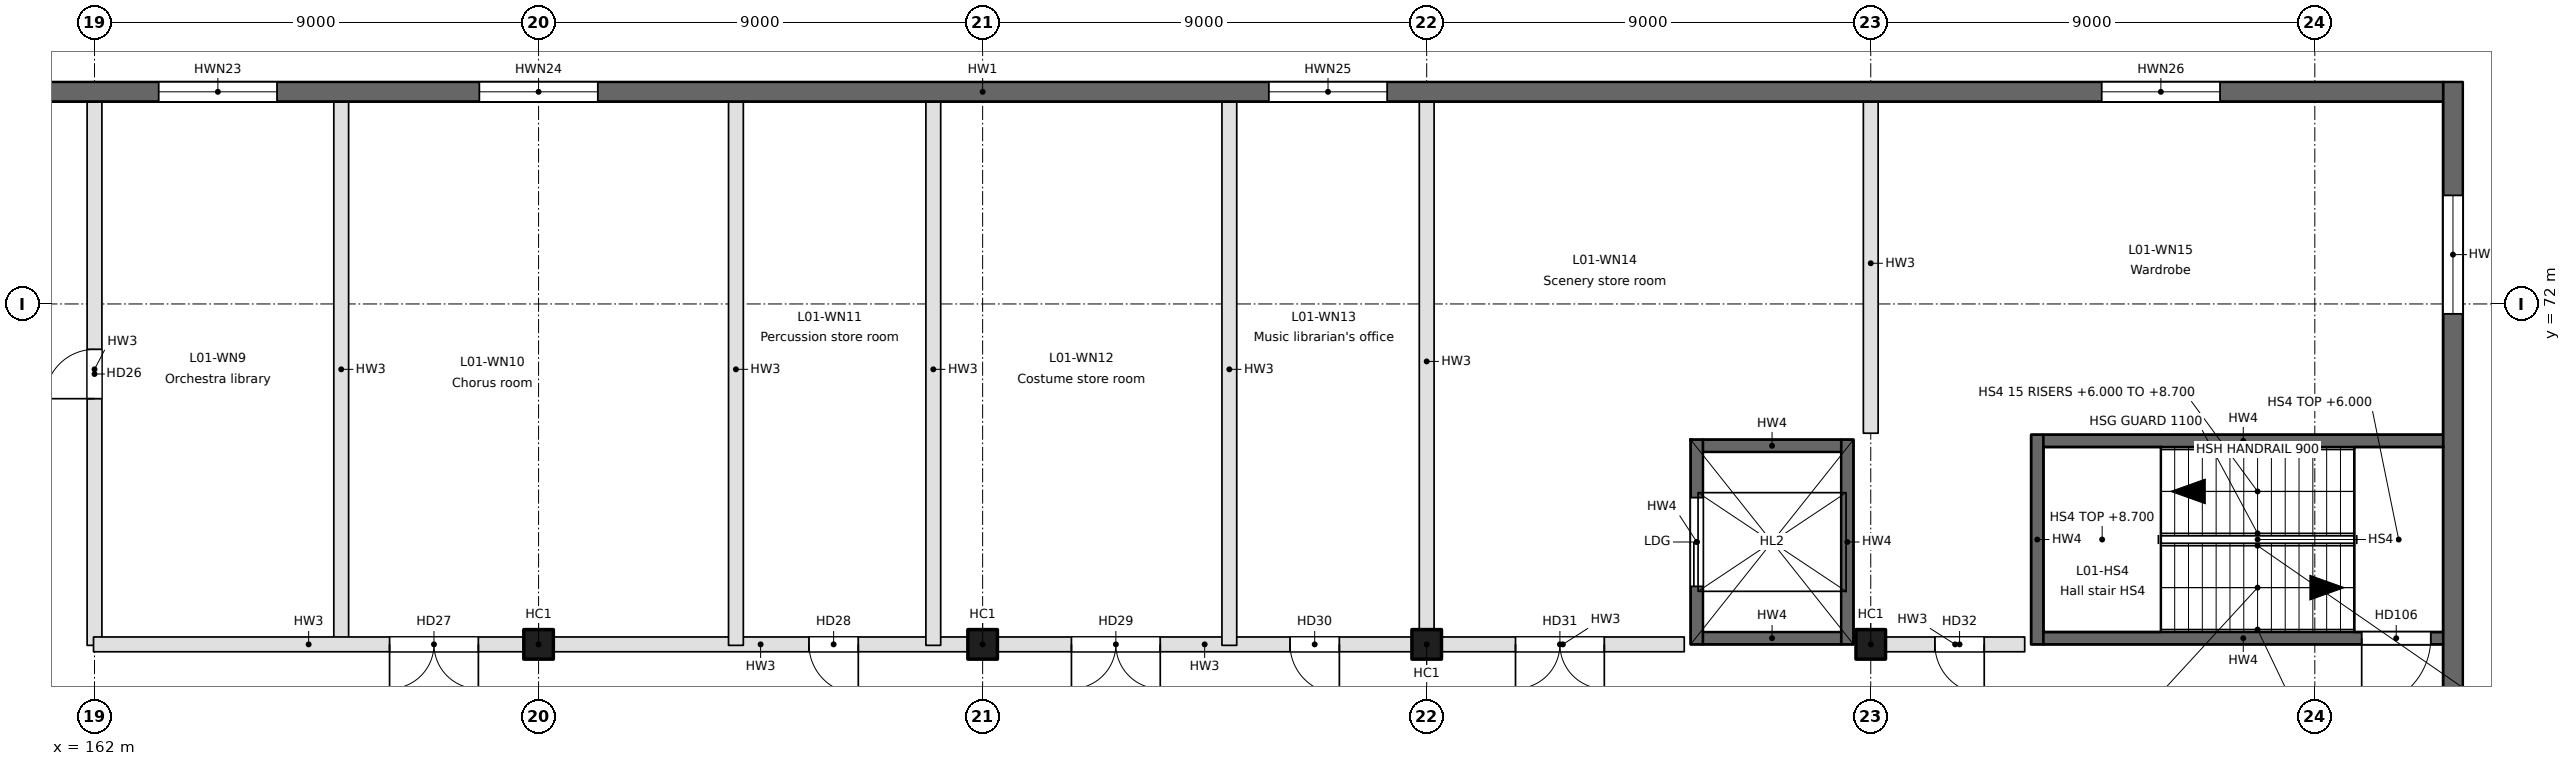
"""IFC4 building model, lengths in metres.
Left out: names, types, materials, properties, quantities, classifications, styles, units other than length and angle.
Written with IfcOpenShell. Run it as: python <this file> out.ifc"""

import sys

from ifc_helpers import new_model, si_unit, direction, frame, frame_2d, origin, origin_2d, place, context, subcontext, project, spatial, rectangle, extrude, element, fill, save


model = new_model("IFC4")
c1 = context("Model", 3, precision=1e-05, world=origin(), true_north=direction((0.0, 1.0)))
c2 = subcontext(c1, "Body", "Model", "MODEL_VIEW")
j1 = project(units=[si_unit("LENGTHUNIT", "METRE"), si_unit("PLANEANGLEUNIT", "RADIAN")], contexts=[c1])
p1 = place(None, origin())
s1 = spatial("IfcSite", under=j1, at=p1, CompositionType="ELEMENT")
p2 = place(p1, origin())
s2 = spatial("IfcBuilding", under=s1, at=p2, CompositionType="ELEMENT")
p3 = place(p2, frame((0.0, 0.0, 6.0)))
s3 = spatial("IfcBuildingStorey", under=s2, at=p3, CompositionType="ELEMENT", Elevation=6.0)
for number, where, z_axis, x_axis in (
    (1, (171.0, 65.1, 0.0), (0.0, 0.0, 1.0), (1.0, 0.0, 0.0)),
    (2, (180.0, 65.1, 0.0), (0.0, 0.0, 1.0), (1.0, 0.0, 0.0)),
    (3, (189.0, 65.1, 0.0), (0.0, 0.0, 1.0), (1.0, 0.0, 0.0)),
    (4, (198.0, 65.1, 0.0), (0.0, 0.0, 1.0), (1.0, 0.0, 0.0)),
):
    element("IfcColumn", number, at=place(p3, frame(where, z_axis=z_axis, x_axis=x_axis)), inside=s3, PredefinedType="COLUMN", context=c2, shape_type="SweptSolid", body=[
        extrude(rectangle(XDim=0.6, YDim=0.6, at=origin_2d()), origin(), (0.0, 0.0, 1.0), 5.4),
    ])
p4 = place(p3, frame((209.8, 76.5, -0.35), z_axis=(0.0, 0.0, 1.0), x_axis=(0.0, -1.0, 0.0)))
e5 = element("IfcWall", 5, at=p4, inside=s3, PredefinedType="SOLIDWALL", context=c2, shape_type="SweptSolid", body=[
    extrude(rectangle(XDim=54.0, YDim=0.4, at=frame_2d((27.0, 0.0))), origin(), (0.0, 0.0, 1.0), 5.4),
])
p5 = place(p4, frame((49.3, 0.0, 1.25)))
e6 = element("IfcOpeningElement", 6, at=p5, cuts=e5, PredefinedType="OPENING", context=c2, shape_type="SweptSolid", body=[
    extrude(rectangle(XDim=2.4, YDim=1.8, at=frame_2d((1.2, 0.9))), frame((0.0, 0.2, 0.0), z_axis=(0.0, -1.0, 0.0), x_axis=(1.0, 0.0, 0.0)), (0.0, 0.0, 1.0), 0.4),
])
p6 = place(p4, frame((2.3, 0.0, 1.25)))
e7 = element("IfcOpeningElement", 7, at=p6, cuts=e5, PredefinedType="OPENING", context=c2, shape_type="SweptSolid", body=[
    extrude(rectangle(XDim=2.4, YDim=1.8, at=frame_2d((1.2, 0.9))), frame((0.0, 0.2, 0.0), z_axis=(0.0, -1.0, 0.0), x_axis=(1.0, 0.0, 0.0)), (0.0, 0.0, 1.0), 0.4),
])
p7 = place(p3, frame((150.4, 76.3, -0.35), z_axis=(0.0, 0.0, 1.0), x_axis=(1.0, 0.0, 0.0)))
e8 = element("IfcWall", 8, at=p7, inside=s3, PredefinedType="SOLIDWALL", context=c2, shape_type="SweptSolid", body=[
    extrude(rectangle(XDim=59.2, YDim=0.4, at=frame_2d((29.6, 0.0))), origin(), (0.0, 0.0, 1.0), 5.4),
])
p8 = place(p7, frame((7.6, 0.0, 1.25)))
e9 = element("IfcOpeningElement", 9, at=p8, cuts=e8, PredefinedType="OPENING", context=c2, shape_type="SweptSolid", body=[
    extrude(rectangle(XDim=2.4, YDim=1.8, at=frame_2d((1.2, 0.9))), frame((0.0, 0.2, 0.0), z_axis=(0.0, -1.0, 0.0), x_axis=(1.0, 0.0, 0.0)), (0.0, 0.0, 1.0), 0.4),
])
p9 = place(p7, frame((12.9, 0.0, 1.25)))
e10 = element("IfcOpeningElement", 10, at=p9, cuts=e8, PredefinedType="OPENING", context=c2, shape_type="SweptSolid", body=[
    extrude(rectangle(XDim=2.4, YDim=1.8, at=frame_2d((1.2, 0.9))), frame((0.0, 0.2, 0.0), z_axis=(0.0, -1.0, 0.0), x_axis=(1.0, 0.0, 0.0)), (0.0, 0.0, 1.0), 0.4),
])
p10 = place(p7, frame((19.4, 0.0, 1.25)))
e11 = element("IfcOpeningElement", 11, at=p10, cuts=e8, PredefinedType="OPENING", context=c2, shape_type="SweptSolid", body=[
    extrude(rectangle(XDim=2.4, YDim=1.8, at=frame_2d((1.2, 0.9))), frame((0.0, 0.2, 0.0), z_axis=(0.0, -1.0, 0.0), x_axis=(1.0, 0.0, 0.0)), (0.0, 0.0, 1.0), 0.4),
])
p11 = place(p7, frame((35.4, 0.0, 1.25)))
e12 = element("IfcOpeningElement", 12, at=p11, cuts=e8, PredefinedType="OPENING", context=c2, shape_type="SweptSolid", body=[
    extrude(rectangle(XDim=2.4, YDim=1.8, at=frame_2d((1.2, 0.9))), frame((0.0, 0.2, 0.0), z_axis=(0.0, -1.0, 0.0), x_axis=(1.0, 0.0, 0.0)), (0.0, 0.0, 1.0), 0.4),
])
p12 = place(p7, frame((52.28, 0.0, 1.25)))
e13 = element("IfcOpeningElement", 13, at=p12, cuts=e8, PredefinedType="OPENING", context=c2, shape_type="SweptSolid", body=[
    extrude(rectangle(XDim=2.4, YDim=1.8, at=frame_2d((1.2, 0.9))), frame((0.0, 0.2, 0.0), z_axis=(0.0, -1.0, 0.0), x_axis=(1.0, 0.0, 0.0)), (0.0, 0.0, 1.0), 0.4),
])
p13 = place(p3, frame((162.0, 65.08, 0.0), z_axis=(0.0, 0.0, 1.0), x_axis=(0.0, 1.0, 0.0)))
e14 = element("IfcWall", 14, at=p13, inside=s3, PredefinedType="PARTITIONING", context=c2, shape_type="SweptSolid", body=[
    extrude(rectangle(XDim=11.19, YDim=0.3, at=frame_2d((5.595, 0.0))), origin(), (0.0, 0.0, 1.0), 5.05),
])
p14 = place(p13, frame((5.0, 0.0, 0.0)))
e15 = element("IfcOpeningElement", 15, at=p14, cuts=e14, PredefinedType="OPENING", context=c2, shape_type="SweptSolid", body=[
    extrude(rectangle(XDim=1.0, YDim=2.1, at=frame_2d((0.5, 1.05))), frame((0.0, 0.15, 0.0), z_axis=(0.0, -1.0, 0.0), x_axis=(1.0, 0.0, 0.0)), (0.0, 0.0, 1.0), 0.3),
])
p15 = place(p3, frame((198.0, 69.38, 0.0), z_axis=(0.0, 0.0, 1.0), x_axis=(0.0, 1.0, 0.0)))
e16 = element("IfcWall", 16, at=p15, inside=s3, PredefinedType="PARTITIONING", context=c2, shape_type="SweptSolid", body=[
    extrude(rectangle(XDim=6.89, YDim=0.3, at=frame_2d((3.445, 0.0))), origin(), (0.0, 0.0, 1.0), 5.05),
])
p16 = place(p3, frame((167.0, 65.08, 0.0), z_axis=(0.0, 0.0, 1.0), x_axis=(0.0, 1.0, 0.0)))
e17 = element("IfcWall", 17, at=p16, inside=s3, PredefinedType="PARTITIONING", context=c2, shape_type="SweptSolid", body=[
    extrude(rectangle(XDim=11.19, YDim=0.3, at=frame_2d((5.595, 0.0))), origin(), (0.0, 0.0, 1.0), 5.05),
])
p17 = place(p3, frame((170.7, 65.1, 0.0), z_axis=(0.0, 0.0, 1.0), x_axis=(-1.0, 0.0, 0.0)))
e18 = element("IfcWall", 18, at=p17, inside=s3, PredefinedType="PARTITIONING", context=c2, shape_type="SweptSolid", body=[
    extrude(rectangle(XDim=8.72, YDim=0.3, at=frame_2d((4.36, 0.0))), origin(), (0.0, 0.0, 1.0), 5.05),
])
p18 = place(p17, frame((0.92, 0.0, 0.0)))
e19 = element("IfcOpeningElement", 19, at=p18, cuts=e18, PredefinedType="OPENING", context=c2, shape_type="SweptSolid", body=[
    extrude(rectangle(XDim=1.8, YDim=2.1, at=frame_2d((0.9, 1.05))), frame((0.0, 0.15, 0.0), z_axis=(0.0, -1.0, 0.0), x_axis=(1.0, 0.0, 0.0)), (0.0, 0.0, 1.0), 0.3),
])
p19 = place(p3, frame((179.7, 65.1, 0.0), z_axis=(0.0, 0.0, 1.0), x_axis=(-1.0, 0.0, 0.0)))
e20 = element("IfcWall", 20, at=p19, inside=s3, PredefinedType="PARTITIONING", context=c2, shape_type="SweptSolid", body=[
    extrude(rectangle(XDim=8.4, YDim=0.3, at=frame_2d((4.2, 0.0))), origin(), (0.0, 0.0, 1.0), 5.05),
])
p20 = place(p19, frame((2.22, 0.0, 0.0)))
e21 = element("IfcOpeningElement", 21, at=p20, cuts=e20, PredefinedType="OPENING", context=c2, shape_type="SweptSolid", body=[
    extrude(rectangle(XDim=1.0, YDim=2.1, at=frame_2d((0.5, 1.05))), frame((0.0, 0.15, 0.0), z_axis=(0.0, -1.0, 0.0), x_axis=(1.0, 0.0, 0.0)), (0.0, 0.0, 1.0), 0.3),
])
p21 = place(p3, frame((188.7, 65.1, 0.0), z_axis=(0.0, 0.0, 1.0), x_axis=(-1.0, 0.0, 0.0)))
e22 = element("IfcWall", 22, at=p21, inside=s3, PredefinedType="PARTITIONING", context=c2, shape_type="SweptSolid", body=[
    extrude(rectangle(XDim=8.4, YDim=0.3, at=frame_2d((4.2, 0.0))), origin(), (0.0, 0.0, 1.0), 5.05),
])
p22 = place(p21, frame((5.1, 0.0, 0.0)))
e23 = element("IfcOpeningElement", 23, at=p22, cuts=e22, PredefinedType="OPENING", context=c2, shape_type="SweptSolid", body=[
    extrude(rectangle(XDim=1.8, YDim=2.1, at=frame_2d((0.9, 1.05))), frame((0.0, 0.15, 0.0), z_axis=(0.0, -1.0, 0.0), x_axis=(1.0, 0.0, 0.0)), (0.0, 0.0, 1.0), 0.3),
])
p23 = place(p21, frame((1.47, 0.0, 0.0)))
e24 = element("IfcOpeningElement", 24, at=p23, cuts=e22, PredefinedType="OPENING", context=c2, shape_type="SweptSolid", body=[
    extrude(rectangle(XDim=1.0, YDim=2.1, at=frame_2d((0.5, 1.05))), frame((0.0, 0.15, 0.0), z_axis=(0.0, -1.0, 0.0), x_axis=(1.0, 0.0, 0.0)), (0.0, 0.0, 1.0), 0.3),
])
p24 = place(p3, frame((194.22, 65.1, 0.0), z_axis=(0.0, 0.0, 1.0), x_axis=(-1.0, 0.0, 0.0)))
e25 = element("IfcWall", 25, at=p24, inside=s3, PredefinedType="PARTITIONING", context=c2, shape_type="SweptSolid", body=[
    extrude(rectangle(XDim=4.92, YDim=0.3, at=frame_2d((2.46, 0.0))), origin(), (0.0, 0.0, 1.0), 5.05),
])
p25 = place(p24, frame((1.62, 0.0, 0.0)))
e26 = element("IfcOpeningElement", 26, at=p25, cuts=e25, PredefinedType="OPENING", context=c2, shape_type="SweptSolid", body=[
    extrude(rectangle(XDim=1.8, YDim=2.1, at=frame_2d((0.9, 1.05))), frame((0.0, 0.15, 0.0), z_axis=(0.0, -1.0, 0.0), x_axis=(1.0, 0.0, 0.0)), (0.0, 0.0, 1.0), 0.3),
])
p26 = place(p3, frame((201.12, 65.1, 0.0), z_axis=(0.0, 0.0, 1.0), x_axis=(-1.0, 0.0, 0.0)))
e27 = element("IfcWall", 27, at=p26, inside=s3, PredefinedType="PARTITIONING", context=c2, shape_type="SweptSolid", body=[
    extrude(rectangle(XDim=2.82, YDim=0.3, at=frame_2d((1.41, 0.0))), origin(), (0.0, 0.0, 1.0), 5.05),
])
p27 = place(p26, frame((0.82, 0.0, 0.0)))
e28 = element("IfcOpeningElement", 28, at=p27, cuts=e27, PredefinedType="OPENING", context=c2, shape_type="SweptSolid", body=[
    extrude(rectangle(XDim=1.0, YDim=2.1, at=frame_2d((0.5, 1.05))), frame((0.0, 0.15, 0.0), z_axis=(0.0, -1.0, 0.0), x_axis=(1.0, 0.0, 0.0)), (0.0, 0.0, 1.0), 0.3),
])
for number, where, z_axis, x_axis in (
    (29, (175.0, 65.08, 0.0), (0.0, 0.0, 1.0), (0.0, 1.0, 0.0)),
    (30, (179.0, 65.08, 0.0), (0.0, 0.0, 1.0), (0.0, 1.0, 0.0)),
    (31, (185.0, 65.08, 0.0), (0.0, 0.0, 1.0), (0.0, 1.0, 0.0)),
):
    element("IfcWall", number, at=place(p3, frame(where, z_axis=z_axis, x_axis=x_axis)), inside=s3, PredefinedType="PARTITIONING", context=c2, shape_type="SweptSolid", body=[
        extrude(rectangle(XDim=11.19, YDim=0.3, at=frame_2d((5.595, 0.0))), origin(), (0.0, 0.0, 1.0), 5.05),
    ])
p28 = place(p3, frame((189.0, 65.4, 0.0), z_axis=(0.0, 0.0, 1.0), x_axis=(0.0, 1.0, 0.0)))
e32 = element("IfcWall", 32, at=p28, inside=s3, PredefinedType="PARTITIONING", context=c2, shape_type="SweptSolid", body=[
    extrude(rectangle(XDim=10.87, YDim=0.3, at=frame_2d((5.435, 0.0))), origin(), (0.0, 0.0, 1.0), 5.05),
])
p29 = place(p3, frame((201.375, 65.1, -0.35), z_axis=(0.0, 0.0, 1.0), x_axis=(0.0, 1.0, 0.0)))
e33 = element("IfcWall", 33, at=p29, inside=s3, PredefinedType="SOLIDWALL", context=c2, shape_type="SweptSolid", body=[
    extrude(rectangle(XDim=4.25, YDim=0.25, at=frame_2d((2.125, 0.0))), origin(), (0.0, 0.0, 1.0), 5.4),
])
p30 = place(p3, frame((209.6, 65.225, -0.35), z_axis=(0.0, 0.0, 1.0), x_axis=(-1.0, 0.0, 0.0)))
e34 = element("IfcWall", 34, at=p30, inside=s3, PredefinedType="SOLIDWALL", context=c2, shape_type="SweptSolid", body=[
    extrude(rectangle(XDim=8.1, YDim=0.25, at=frame_2d((4.05, 0.0))), origin(), (0.0, 0.0, 1.0), 5.4),
])
p31 = place(p30, frame((0.25, 0.0, 0.35)))
e35 = element("IfcOpeningElement", 35, at=p31, cuts=e34, PredefinedType="OPENING", context=c2, shape_type="SweptSolid", body=[
    extrude(rectangle(XDim=1.4, YDim=2.1, at=frame_2d((0.7, 1.05))), frame((0.0, 0.125, 0.0), z_axis=(0.0, -1.0, 0.0), x_axis=(1.0, 0.0, 0.0)), (0.0, 0.0, 1.0), 0.25),
])
p32 = place(p3, frame((201.5, 69.225, -0.35), z_axis=(0.0, 0.0, 1.0), x_axis=(1.0, 0.0, 0.0)))
e36 = element("IfcWall", 36, at=p32, inside=s3, PredefinedType="SOLIDWALL", context=c2, shape_type="SweptSolid", body=[
    extrude(rectangle(XDim=8.1, YDim=0.25, at=frame_2d((4.05, 0.0))), origin(), (0.0, 0.0, 1.0), 5.4),
])
p33 = place(p3, frame((194.475, 65.1, -0.35), z_axis=(0.0, 0.0, 1.0), x_axis=(0.0, 1.0, 0.0)))
e37 = element("IfcWall", 37, at=p33, inside=s3, PredefinedType="SOLIDWALL", context=c2, shape_type="SweptSolid", body=[
    extrude(rectangle(XDim=4.15, YDim=0.25, at=frame_2d((2.075, 0.0))), origin(), (0.0, 0.0, 1.0), 5.4),
])
p34 = place(p33, frame((1.175, 0.0, 0.35)))
e38 = element("IfcOpeningElement", 38, at=p34, cuts=e37, PredefinedType="OPENING", context=c2, shape_type="SweptSolid", body=[
    extrude(rectangle(XDim=1.8, YDim=2.4, at=frame_2d((0.9, 1.2))), frame((0.0, 0.125, 0.0), z_axis=(0.0, -1.0, 0.0), x_axis=(1.0, 0.0, 0.0)), (0.0, 0.0, 1.0), 0.25),
])
p35 = place(p3, frame((197.525, 69.25, -0.35), z_axis=(0.0, 0.0, 1.0), x_axis=(0.0, -1.0, 0.0)))
e39 = element("IfcWall", 39, at=p35, inside=s3, PredefinedType="SOLIDWALL", context=c2, shape_type="SweptSolid", body=[
    extrude(rectangle(XDim=4.15, YDim=0.25, at=frame_2d((2.075, 0.0))), origin(), (0.0, 0.0, 1.0), 5.4),
])
for number, where, z_axis, x_axis in (
    (40, (197.4, 65.225, -0.35), (0.0, 0.0, 1.0), (-1.0, 0.0, 0.0)),
    (41, (194.6, 69.125, -0.35), (0.0, 0.0, 1.0), (1.0, 0.0, 0.0)),
):
    element("IfcWall", number, at=place(p3, frame(where, z_axis=z_axis, x_axis=x_axis)), inside=s3, PredefinedType="SOLIDWALL", context=c2, shape_type="SweptSolid", body=[
        extrude(rectangle(XDim=2.8, YDim=0.25, at=frame_2d((1.4, 0.0))), origin(), (0.0, 0.0, 1.0), 5.4),
    ])
p36 = place(p14, origin())
e42 = element("IfcDoor", 42, at=p36, inside=s3, OperationType="SINGLE_SWING_LEFT", PredefinedType="DOOR", context=c2, shape_type="SweptSolid", body=[
    extrude(rectangle(XDim=1.0, YDim=2.1, at=frame_2d((0.5, 1.05))), frame((0.0, 0.025, 0.0), z_axis=(0.0, -1.0, 0.0), x_axis=(1.0, 0.0, 0.0)), (0.0, 0.0, 1.0), 0.05),
])
fill(e15, e42)
p37 = place(p18, origin())
e43 = element("IfcDoor", 43, at=p37, inside=s3, OperationType="DOUBLE_DOOR_SINGLE_SWING", PredefinedType="DOOR", context=c2, shape_type="SweptSolid", body=[
    extrude(rectangle(XDim=1.8, YDim=2.1, at=frame_2d((0.9, 1.05))), frame((0.0, 0.025, 0.0), z_axis=(0.0, -1.0, 0.0), x_axis=(1.0, 0.0, 0.0)), (0.0, 0.0, 1.0), 0.05),
])
fill(e19, e43)
p38 = place(p20, origin())
e44 = element("IfcDoor", 44, at=p38, inside=s3, OperationType="SINGLE_SWING_LEFT", PredefinedType="DOOR", context=c2, shape_type="SweptSolid", body=[
    extrude(rectangle(XDim=1.0, YDim=2.1, at=frame_2d((0.5, 1.05))), frame((0.0, 0.025, 0.0), z_axis=(0.0, -1.0, 0.0), x_axis=(1.0, 0.0, 0.0)), (0.0, 0.0, 1.0), 0.05),
])
fill(e21, e44)
p39 = place(p22, origin())
e45 = element("IfcDoor", 45, at=p39, inside=s3, OperationType="DOUBLE_DOOR_SINGLE_SWING", PredefinedType="DOOR", context=c2, shape_type="SweptSolid", body=[
    extrude(rectangle(XDim=1.8, YDim=2.1, at=frame_2d((0.9, 1.05))), frame((0.0, 0.025, 0.0), z_axis=(0.0, -1.0, 0.0), x_axis=(1.0, 0.0, 0.0)), (0.0, 0.0, 1.0), 0.05),
])
fill(e23, e45)
p40 = place(p23, origin())
e46 = element("IfcDoor", 46, at=p40, inside=s3, OperationType="SINGLE_SWING_LEFT", PredefinedType="DOOR", context=c2, shape_type="SweptSolid", body=[
    extrude(rectangle(XDim=1.0, YDim=2.1, at=frame_2d((0.5, 1.05))), frame((0.0, 0.025, 0.0), z_axis=(0.0, -1.0, 0.0), x_axis=(1.0, 0.0, 0.0)), (0.0, 0.0, 1.0), 0.05),
])
fill(e24, e46)
p41 = place(p25, origin())
e47 = element("IfcDoor", 47, at=p41, inside=s3, OperationType="DOUBLE_DOOR_SINGLE_SWING", PredefinedType="DOOR", context=c2, shape_type="SweptSolid", body=[
    extrude(rectangle(XDim=1.8, YDim=2.1, at=frame_2d((0.9, 1.05))), frame((0.0, 0.025, 0.0), z_axis=(0.0, -1.0, 0.0), x_axis=(1.0, 0.0, 0.0)), (0.0, 0.0, 1.0), 0.05),
])
fill(e26, e47)
p42 = place(p27, origin())
e48 = element("IfcDoor", 48, at=p42, inside=s3, OperationType="SINGLE_SWING_LEFT", PredefinedType="DOOR", context=c2, shape_type="SweptSolid", body=[
    extrude(rectangle(XDim=1.0, YDim=2.1, at=frame_2d((0.5, 1.05))), frame((0.0, 0.025, 0.0), z_axis=(0.0, -1.0, 0.0), x_axis=(1.0, 0.0, 0.0)), (0.0, 0.0, 1.0), 0.05),
])
fill(e28, e48)
p43 = place(p6, origin())
e49 = element("IfcWindow", 49, at=p43, inside=s3, PartitioningType="SINGLE_PANEL", PredefinedType="WINDOW", context=c2, shape_type="SweptSolid", body=[
    extrude(rectangle(XDim=2.4, YDim=1.8, at=frame_2d((1.2, 0.9))), frame((0.0, 0.03, 0.0), z_axis=(0.0, -1.0, 0.0), x_axis=(1.0, 0.0, 0.0)), (0.0, 0.0, 1.0), 0.06),
])
fill(e7, e49)
p44 = place(p9, origin())
e50 = element("IfcWindow", 50, at=p44, inside=s3, PartitioningType="SINGLE_PANEL", PredefinedType="WINDOW", context=c2, shape_type="SweptSolid", body=[
    extrude(rectangle(XDim=2.4, YDim=1.8, at=frame_2d((1.2, 0.9))), frame((0.0, 0.03, 0.0), z_axis=(0.0, -1.0, 0.0), x_axis=(1.0, 0.0, 0.0)), (0.0, 0.0, 1.0), 0.06),
])
fill(e10, e50)
p45 = place(p10, origin())
e51 = element("IfcWindow", 51, at=p45, inside=s3, PartitioningType="SINGLE_PANEL", PredefinedType="WINDOW", context=c2, shape_type="SweptSolid", body=[
    extrude(rectangle(XDim=2.4, YDim=1.8, at=frame_2d((1.2, 0.9))), frame((0.0, 0.03, 0.0), z_axis=(0.0, -1.0, 0.0), x_axis=(1.0, 0.0, 0.0)), (0.0, 0.0, 1.0), 0.06),
])
fill(e11, e51)
p46 = place(p11, origin())
e52 = element("IfcWindow", 52, at=p46, inside=s3, PartitioningType="SINGLE_PANEL", PredefinedType="WINDOW", context=c2, shape_type="SweptSolid", body=[
    extrude(rectangle(XDim=2.4, YDim=1.8, at=frame_2d((1.2, 0.9))), frame((0.0, 0.03, 0.0), z_axis=(0.0, -1.0, 0.0), x_axis=(1.0, 0.0, 0.0)), (0.0, 0.0, 1.0), 0.06),
])
fill(e12, e52)
p47 = place(p12, origin())
e53 = element("IfcWindow", 53, at=p47, inside=s3, PartitioningType="SINGLE_PANEL", PredefinedType="WINDOW", context=c2, shape_type="SweptSolid", body=[
    extrude(rectangle(XDim=2.4, YDim=1.8, at=frame_2d((1.2, 0.9))), frame((0.0, 0.03, 0.0), z_axis=(0.0, -1.0, 0.0), x_axis=(1.0, 0.0, 0.0)), (0.0, 0.0, 1.0), 0.06),
])
fill(e13, e53)
p48 = place(p31, origin())
e54 = element("IfcDoor", 54, at=p48, inside=s3, OperationType="SINGLE_SWING_RIGHT", PredefinedType="DOOR", context=c2, shape_type="SweptSolid", body=[
    extrude(rectangle(XDim=1.4, YDim=2.1, at=frame_2d((0.7, 1.05))), frame((0.0, 0.025, 0.0), z_axis=(0.0, -1.0, 0.0), x_axis=(1.0, 0.0, 0.0)), (0.0, 0.0, 1.0), 0.05),
])
fill(e35, e54)
p49 = place(p34, origin())
e55 = element("IfcDoor", 55, at=p49, inside=s3, OperationType="SLIDING_TO_RIGHT", PredefinedType="DOOR", context=c2, shape_type="SweptSolid", body=[
    extrude(rectangle(XDim=1.8, YDim=2.4, at=frame_2d((0.9, 1.2))), frame((0.0, 0.025, 0.0), z_axis=(0.0, -1.0, 0.0), x_axis=(1.0, 0.0, 0.0)), (0.0, 0.0, 1.0), 0.05),
])
fill(e38, e55)
save(model, sys.argv[1])
